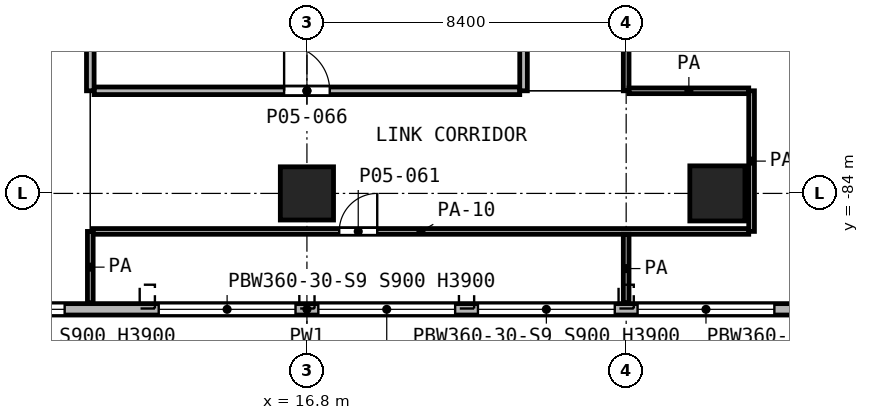
"""IFC4 building model, lengths in metres.
Left out: names, types, materials, properties, quantities, classifications, styles, units other than length and angle.
Written with IfcOpenShell. Run it as: python <this file> out.ifc"""

import sys

from ifc_helpers import new_model, si_unit, direction, frame, frame_2d, origin, origin_2d, place, context, subcontext, project, spatial, rectangle, extrude, element, fill, save


model = new_model("IFC4")
c1 = context("Model", 3, precision=1e-05, world=origin(), true_north=direction((0.0, 1.0)))
c2 = subcontext(c1, "Body", "Model", "MODEL_VIEW")
j1 = project(units=[si_unit("LENGTHUNIT", "METRE"), si_unit("PLANEANGLEUNIT", "RADIAN")], contexts=[c1])
p1 = place(None, origin())
s1 = spatial("IfcSite", under=j1, at=p1, CompositionType="ELEMENT")
p2 = place(p1, origin())
s2 = spatial("IfcBuilding", under=s1, at=p2, CompositionType="ELEMENT")
p3 = place(p2, frame((0.0, 0.0, 23.8)))
s3 = spatial("IfcBuildingStorey", under=s2, at=p3, CompositionType="ELEMENT", Elevation=23.8)
p4 = place(p3, frame((16.8, -84.0, 0.0), z_axis=(0.0, 0.0, 1.0), x_axis=(1.0, 0.0, 0.0)))
e1 = element("IfcColumn", 1, at=p4, inside=s3, PredefinedType="COLUMN", context=c2, shape_type="SweptSolid", body=[
    extrude(rectangle(XDim=1.4, YDim=1.4, at=origin_2d()), origin(), (0.0, 0.0, 1.0), 5.2),
])
p5 = place(p3, frame((27.6, -84.0, 0.0), z_axis=(0.0, 0.0, 1.0), x_axis=(1.0, 0.0, 0.0)))
e2 = element("IfcColumn", 2, at=p5, inside=s3, PredefinedType="COLUMN", context=c2, shape_type="SweptSolid", body=[
    extrude(rectangle(XDim=1.45, YDim=1.45, at=origin_2d()), origin(), (0.0, 0.0, 1.0), 5.2),
])
p6 = place(p3, frame((2.862, -87.05, 0.0), z_axis=(0.0, 0.0, 1.0), x_axis=(1.0, 0.0, 0.0)))
e3 = element("IfcWall", 3, at=p6, inside=s3, PredefinedType="SOLIDWALL", context=c2, shape_type="SweptSolid", body=[
    extrude(rectangle(XDim=27.876, YDim=0.3, at=frame_2d((13.938, 0.0))), origin(), (0.0, 0.0, 1.0), 4.85),
])
p7 = place(p6, frame((1.638, 0.0, 0.9)))
e4 = element("IfcOpeningElement", 4, at=p7, cuts=e3, PredefinedType="OPENING", context=c2, shape_type="SweptSolid", body=[
    extrude(rectangle(XDim=3.6, YDim=3.0, at=frame_2d((1.8, 1.5))), frame((0.0, 0.16, 0.0), z_axis=(0.0, -1.0, 0.0), x_axis=(1.0, 0.0, 0.0)), (0.0, 0.0, 1.0), 0.32),
])
p8 = place(p6, frame((6.363, 0.0, 0.9)))
e5 = element("IfcOpeningElement", 5, at=p8, cuts=e3, PredefinedType="OPENING", context=c2, shape_type="SweptSolid", body=[
    extrude(rectangle(XDim=1.2, YDim=3.0, at=frame_2d((0.6, 1.5))), frame((0.0, 0.16, 0.0), z_axis=(0.0, -1.0, 0.0), x_axis=(1.0, 0.0, 0.0)), (0.0, 0.0, 1.0), 0.32),
])
p9 = place(p6, frame((10.038, 0.0, 0.9)))
e6 = element("IfcOpeningElement", 6, at=p9, cuts=e3, PredefinedType="OPENING", context=c2, shape_type="SweptSolid", body=[
    extrude(rectangle(XDim=3.6, YDim=3.0, at=frame_2d((1.8, 1.5))), frame((0.0, 0.16, 0.0), z_axis=(0.0, -1.0, 0.0), x_axis=(1.0, 0.0, 0.0)), (0.0, 0.0, 1.0), 0.32),
])
p10 = place(p6, frame((14.238, 0.0, 0.9)))
e7 = element("IfcOpeningElement", 7, at=p10, cuts=e3, PredefinedType="OPENING", context=c2, shape_type="SweptSolid", body=[
    extrude(rectangle(XDim=3.6, YDim=3.0, at=frame_2d((1.8, 1.5))), frame((0.0, 0.16, 0.0), z_axis=(0.0, -1.0, 0.0), x_axis=(1.0, 0.0, 0.0)), (0.0, 0.0, 1.0), 0.32),
])
p11 = place(p6, frame((18.438, 0.0, 0.9)))
e8 = element("IfcOpeningElement", 8, at=p11, cuts=e3, PredefinedType="OPENING", context=c2, shape_type="SweptSolid", body=[
    extrude(rectangle(XDim=3.6, YDim=3.0, at=frame_2d((1.8, 1.5))), frame((0.0, 0.16, 0.0), z_axis=(0.0, -1.0, 0.0), x_axis=(1.0, 0.0, 0.0)), (0.0, 0.0, 1.0), 0.32),
])
p12 = place(p6, frame((22.638, 0.0, 0.9)))
e9 = element("IfcOpeningElement", 9, at=p12, cuts=e3, PredefinedType="OPENING", context=c2, shape_type="SweptSolid", body=[
    extrude(rectangle(XDim=3.6, YDim=3.0, at=frame_2d((1.8, 1.5))), frame((0.0, 0.16, 0.0), z_axis=(0.0, -1.0, 0.0), x_axis=(1.0, 0.0, 0.0)), (0.0, 0.0, 1.0), 0.32),
])
p13 = place(p3, frame((11.175, -85.0, 0.0), z_axis=(0.0, 0.0, 1.0), x_axis=(1.0, 0.0, 0.0)))
e10 = element("IfcWall", 10, at=p13, inside=s3, PredefinedType="PARTITIONING", context=c2, shape_type="SweptSolid", body=[
    extrude(rectangle(XDim=17.25, YDim=0.15, at=frame_2d((8.625, 0.0))), origin(), (0.0, 0.0, 1.0), 3.95),
])
p14 = place(p13, frame((6.475, 0.0, 0.0)))
e11 = element("IfcOpeningElement", 11, at=p14, cuts=e10, PredefinedType="OPENING", context=c2, shape_type="SweptSolid", body=[
    extrude(rectangle(XDim=1.0, YDim=2.1, at=frame_2d((0.5, 1.05))), frame((0.0, 0.085, 0.0), z_axis=(0.0, -1.0, 0.0), x_axis=(1.0, 0.0, 0.0)), (0.0, 0.0, 1.0), 0.17),
])
p15 = place(p3, frame((25.275, -81.3, 0.0), z_axis=(0.0, 0.0, 1.0), x_axis=(1.0, 0.0, 0.0)))
e12 = element("IfcWall", 12, at=p15, inside=s3, PredefinedType="PARTITIONING", context=c2, shape_type="SweptSolid", body=[
    extrude(rectangle(XDim=3.15, YDim=0.15, at=frame_2d((1.575, 0.0))), origin(), (0.0, 0.0, 1.0), 4.85),
])
p16 = place(p3, frame((11.1, -86.88, 0.0), z_axis=(0.0, 0.0, 1.0), x_axis=(0.0, 1.0, 0.0)))
e13 = element("IfcWall", 13, at=p16, inside=s3, PredefinedType="PARTITIONING", context=c2, shape_type="SweptSolid", body=[
    extrude(rectangle(XDim=1.88, YDim=0.15, at=frame_2d((0.94, 0.0))), origin(), (0.0, 0.0, 1.0), 4.85),
])
p17 = place(p3, frame((25.2, -86.88, 0.0), z_axis=(0.0, 0.0, 1.0), x_axis=(0.0, 1.0, 0.0)))
e14 = element("IfcWall", 14, at=p17, inside=s3, PredefinedType="PARTITIONING", context=c2, shape_type="SweptSolid", body=[
    extrude(rectangle(XDim=1.805, YDim=0.15, at=frame_2d((0.902, 0.0))), origin(), (0.0, 0.0, 1.0), 4.85),
])
p18 = place(p3, frame((25.2, -81.3, 0.0), z_axis=(0.0, 0.0, 1.0), x_axis=(0.0, 1.0, 0.0)))
e15 = element("IfcWall", 15, at=p18, inside=s3, PredefinedType="PARTITIONING", context=c2, shape_type="SweptSolid", body=[
    extrude(rectangle(XDim=26.6, YDim=0.15, at=frame_2d((13.3, 0.0))), origin(), (0.0, 0.0, 1.0), 4.85),
])
p19 = place(p18, frame((20.7, 0.0, 0.0)))
e16 = element("IfcOpeningElement", 16, at=p19, cuts=e15, PredefinedType="OPENING", context=c2, shape_type="SweptSolid", body=[
    extrude(rectangle(XDim=1.0, YDim=2.1, at=frame_2d((0.5, 1.05))), frame((0.0, 0.085, 0.0), z_axis=(0.0, -1.0, 0.0), x_axis=(1.0, 0.0, 0.0)), (0.0, 0.0, 1.0), 0.17),
])
p20 = place(p18, frame((12.25, 0.0, 0.0)))
e17 = element("IfcOpeningElement", 17, at=p20, cuts=e15, PredefinedType="OPENING", context=c2, shape_type="SweptSolid", body=[
    extrude(rectangle(XDim=1.0, YDim=2.1, at=frame_2d((0.5, 1.05))), frame((0.0, 0.085, 0.0), z_axis=(0.0, -1.0, 0.0), x_axis=(1.0, 0.0, 0.0)), (0.0, 0.0, 1.0), 0.17),
])
p21 = place(p18, frame((7.45, 0.0, 0.0)))
e18 = element("IfcOpeningElement", 18, at=p21, cuts=e15, PredefinedType="OPENING", context=c2, shape_type="SweptSolid", body=[
    extrude(rectangle(XDim=1.0, YDim=2.1, at=frame_2d((0.5, 1.05))), frame((0.0, 0.085, 0.0), z_axis=(0.0, -1.0, 0.0), x_axis=(1.0, 0.0, 0.0)), (0.0, 0.0, 1.0), 0.17),
])
p22 = place(p18, frame((3.3, 0.0, 0.0)))
e19 = element("IfcOpeningElement", 19, at=p22, cuts=e15, PredefinedType="OPENING", context=c2, shape_type="SweptSolid", body=[
    extrude(rectangle(XDim=1.0, YDim=2.1, at=frame_2d((0.5, 1.05))), frame((0.0, 0.085, 0.0), z_axis=(0.0, -1.0, 0.0), x_axis=(1.0, 0.0, 0.0)), (0.0, 0.0, 1.0), 0.17),
])
p23 = place(p18, frame((1.4, 0.0, 0.0)))
e20 = element("IfcOpeningElement", 20, at=p23, cuts=e15, PredefinedType="OPENING", context=c2, shape_type="SweptSolid", body=[
    extrude(rectangle(XDim=1.0, YDim=2.1, at=frame_2d((0.5, 1.05))), frame((0.0, 0.085, 0.0), z_axis=(0.0, -1.0, 0.0), x_axis=(1.0, 0.0, 0.0)), (0.0, 0.0, 1.0), 0.17),
])
p24 = place(p3, frame((28.5, -85.0, 0.0), z_axis=(0.0, 0.0, 1.0), x_axis=(0.0, 1.0, 0.0)))
e21 = element("IfcWall", 21, at=p24, inside=s3, PredefinedType="PARTITIONING", context=c2, shape_type="SweptSolid", body=[
    extrude(rectangle(XDim=3.7, YDim=0.15, at=frame_2d((1.85, 0.0))), origin(), (0.0, 0.0, 1.0), 3.45),
])
p25 = place(p3, frame((11.2, -81.3, 0.0), z_axis=(0.0, 0.0, 1.0), x_axis=(1.0, 0.0, 0.0)))
e22 = element("IfcWall", 22, at=p25, inside=s3, PredefinedType="PARTITIONING", context=c2, shape_type="SweptSolid", body=[
    extrude(rectangle(XDim=11.2, YDim=0.2, at=frame_2d((5.6, 0.0))), origin(), (0.0, 0.0, 1.0), 4.85),
])
p26 = place(p25, frame((5.0, 0.0, 0.0)))
e23 = element("IfcOpeningElement", 23, at=p26, cuts=e22, PredefinedType="OPENING", context=c2, shape_type="SweptSolid", body=[
    extrude(rectangle(XDim=1.2, YDim=2.1, at=frame_2d((0.6, 1.05))), frame((0.0, 0.11, 0.0), z_axis=(0.0, -1.0, 0.0), x_axis=(1.0, 0.0, 0.0)), (0.0, 0.0, 1.0), 0.22),
])
for number, where, z_axis, x_axis in (
    (24, (11.1, -81.3, 0.0), (0.0, 0.0, 1.0), (0.0, 1.0, 0.0)),
    (25, (22.5, -81.3, 0.0), (0.0, 0.0, 1.0), (0.0, 1.0, 0.0)),
):
    element("IfcWall", number, at=place(p3, frame(where, z_axis=z_axis, x_axis=x_axis)), inside=s3, PredefinedType="PARTITIONING", context=c2, shape_type="SweptSolid", body=[
        extrude(rectangle(XDim=5.7, YDim=0.2, at=frame_2d((2.85, 0.0))), origin(), (0.0, 0.0, 1.0), 4.85),
    ])
p27 = place(p8, origin())
e26 = element("IfcWindow", 26, at=p27, inside=s3, PartitioningType="SINGLE_PANEL", PredefinedType="WINDOW", context=c2, shape_type="SweptSolid", body=[
    extrude(rectangle(XDim=1.2, YDim=3.0, at=frame_2d((0.6, 1.5))), frame((0.0, 0.03, 0.0), z_axis=(0.0, -1.0, 0.0), x_axis=(1.0, 0.0, 0.0)), (0.0, 0.0, 1.0), 0.06),
])
fill(e5, e26)
p28 = place(p9, origin())
e27 = element("IfcWindow", 27, at=p28, inside=s3, PartitioningType="SINGLE_PANEL", PredefinedType="WINDOW", context=c2, shape_type="SweptSolid", body=[
    extrude(rectangle(XDim=3.6, YDim=3.0, at=frame_2d((1.8, 1.5))), frame((0.0, 0.03, 0.0), z_axis=(0.0, -1.0, 0.0), x_axis=(1.0, 0.0, 0.0)), (0.0, 0.0, 1.0), 0.06),
])
fill(e6, e27)
p29 = place(p10, origin())
e28 = element("IfcWindow", 28, at=p29, inside=s3, PartitioningType="SINGLE_PANEL", PredefinedType="WINDOW", context=c2, shape_type="SweptSolid", body=[
    extrude(rectangle(XDim=3.6, YDim=3.0, at=frame_2d((1.8, 1.5))), frame((0.0, 0.03, 0.0), z_axis=(0.0, -1.0, 0.0), x_axis=(1.0, 0.0, 0.0)), (0.0, 0.0, 1.0), 0.06),
])
fill(e7, e28)
p30 = place(p11, origin())
e29 = element("IfcWindow", 29, at=p30, inside=s3, PartitioningType="SINGLE_PANEL", PredefinedType="WINDOW", context=c2, shape_type="SweptSolid", body=[
    extrude(rectangle(XDim=3.6, YDim=3.0, at=frame_2d((1.8, 1.5))), frame((0.0, 0.03, 0.0), z_axis=(0.0, -1.0, 0.0), x_axis=(1.0, 0.0, 0.0)), (0.0, 0.0, 1.0), 0.06),
])
fill(e8, e29)
p31 = place(p12, origin())
e30 = element("IfcWindow", 30, at=p31, inside=s3, PartitioningType="SINGLE_PANEL", PredefinedType="WINDOW", context=c2, shape_type="SweptSolid", body=[
    extrude(rectangle(XDim=3.6, YDim=3.0, at=frame_2d((1.8, 1.5))), frame((0.0, 0.03, 0.0), z_axis=(0.0, -1.0, 0.0), x_axis=(1.0, 0.0, 0.0)), (0.0, 0.0, 1.0), 0.06),
])
fill(e9, e30)
p32 = place(p26, origin())
e31 = element("IfcDoor", 31, at=p32, inside=s3, OperationType="SINGLE_SWING_LEFT", PredefinedType="DOOR", context=c2, shape_type="SweptSolid", body=[
    extrude(rectangle(XDim=1.2, YDim=2.1, at=frame_2d((0.6, 1.05))), frame((0.0, 0.025, 0.0), z_axis=(0.0, -1.0, 0.0), x_axis=(1.0, 0.0, 0.0)), (0.0, 0.0, 1.0), 0.05),
])
fill(e23, e31)
p33 = place(p14, origin())
e32 = element("IfcDoor", 32, at=p33, inside=s3, OperationType="SINGLE_SWING_RIGHT", PredefinedType="DOOR", context=c2, shape_type="SweptSolid", body=[
    extrude(rectangle(XDim=1.0, YDim=2.1, at=frame_2d((0.5, 1.05))), frame((0.0, 0.025, 0.0), z_axis=(0.0, -1.0, 0.0), x_axis=(1.0, 0.0, 0.0)), (0.0, 0.0, 1.0), 0.05),
])
fill(e11, e32)
save(model, sys.argv[1])
